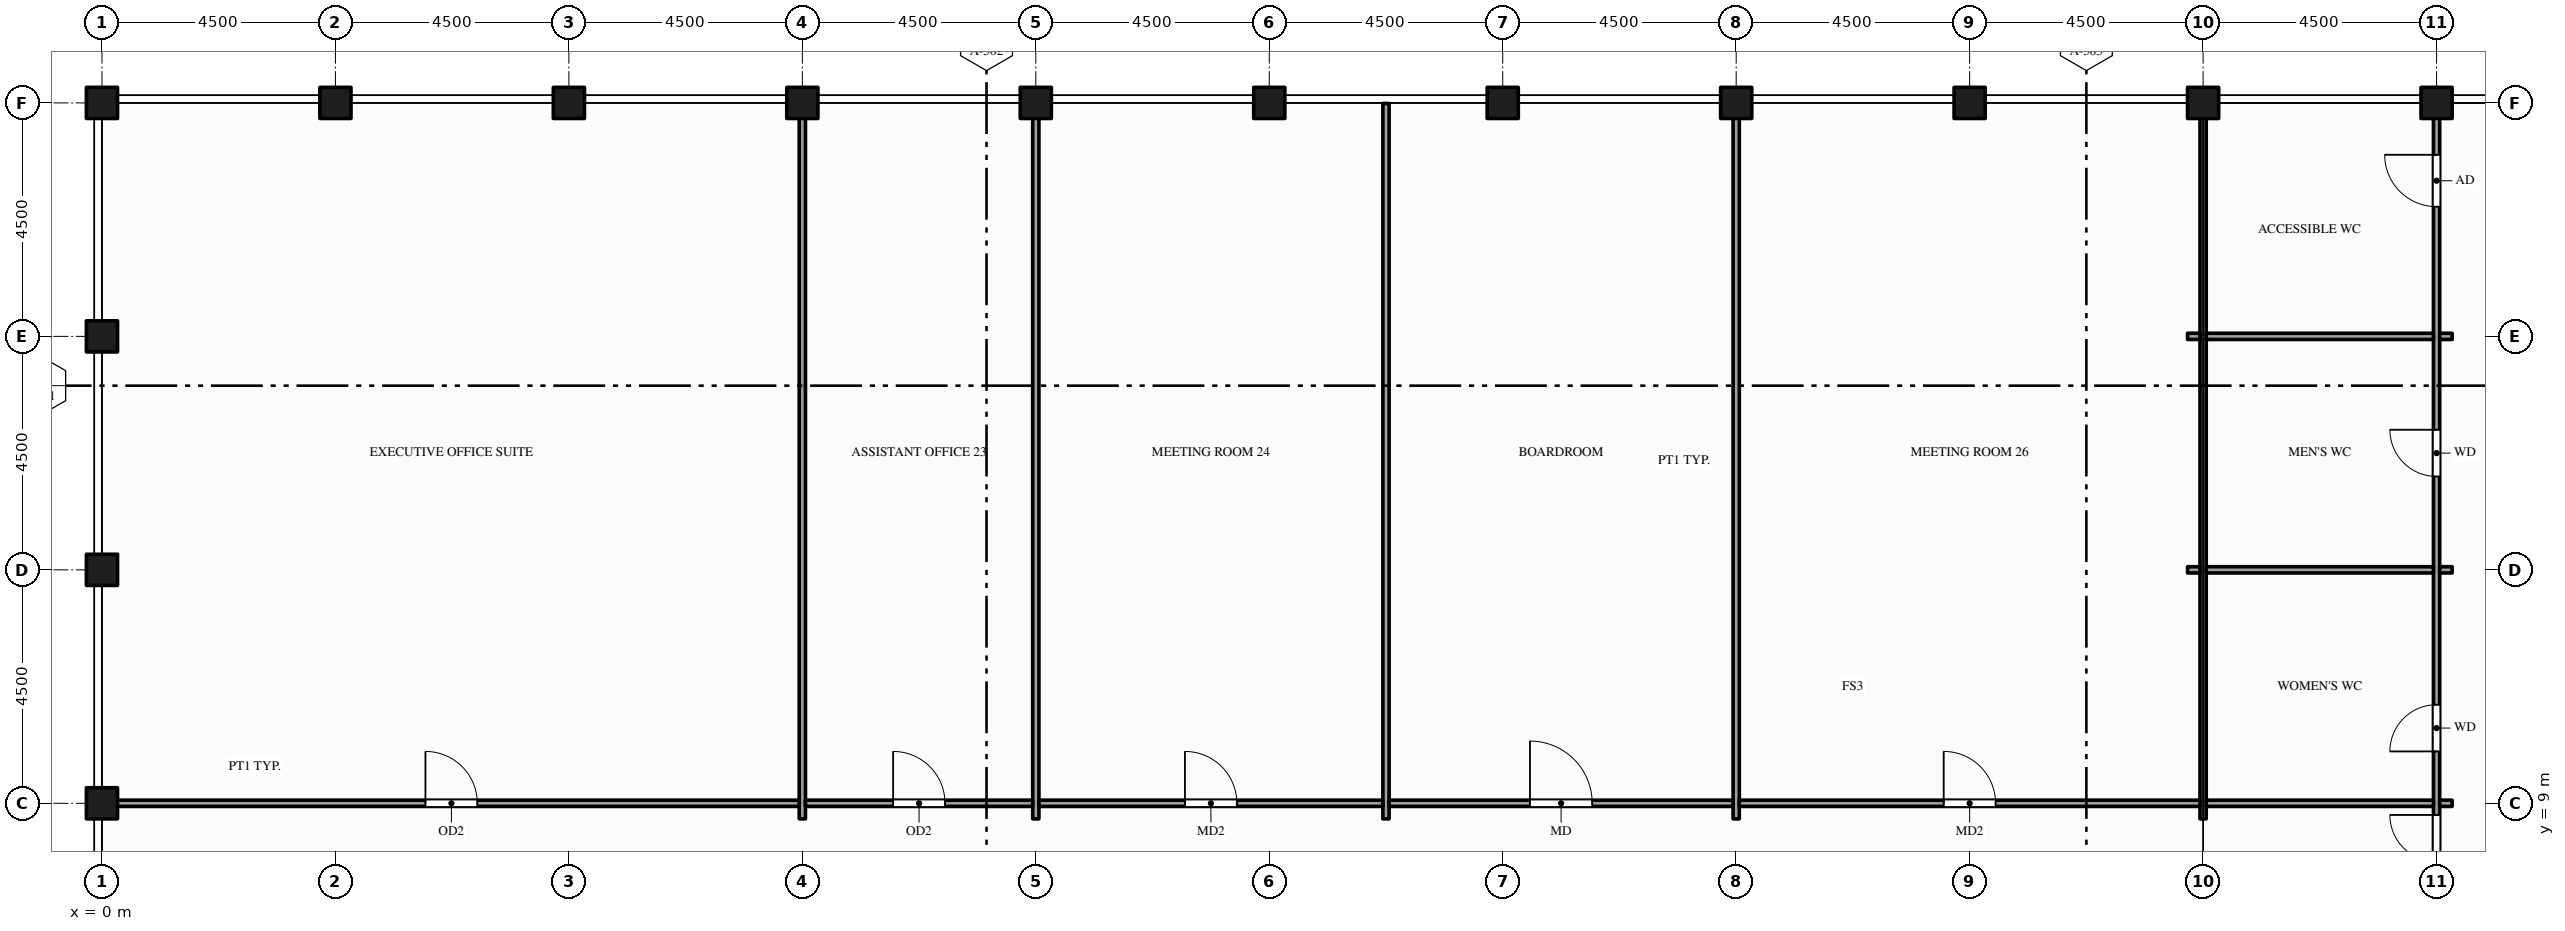
"""IFC4 building model, lengths in metres.
Left out: names, types, materials, properties, quantities, classifications, styles, units other than length and angle.
Written with IfcOpenShell. Run it as: python <this file> out.ifc"""

import sys

from ifc_helpers import new_model, si_unit, direction, frame, frame_2d, origin, origin_2d, place, context, subcontext, project, spatial, rectangle, hollow_rectangle, extrude, element, fill, save


model = new_model("IFC4")
c1 = context("Model", 3, precision=1e-05, world=origin(), true_north=direction((0.0, 1.0)))
c2 = subcontext(c1, "Body", "Model", "MODEL_VIEW")
j1 = project(units=[si_unit("LENGTHUNIT", "METRE"), si_unit("PLANEANGLEUNIT", "RADIAN")], contexts=[c1])
p1 = place(None, origin())
s1 = spatial("IfcSite", under=j1, at=p1, CompositionType="ELEMENT")
p2 = place(p1, origin())
s2 = spatial("IfcBuilding", under=s1, at=p2, CompositionType="ELEMENT")
p3 = place(p2, frame((0.0, 0.0, 341.0)))
s3 = spatial("IfcBuildingStorey", under=s2, at=p3, CompositionType="ELEMENT", Elevation=341.0)
for number, where, z_axis, x_axis in (
    (1, (0.0, 9.0, -0.15), (0.0, 0.0, 1.0), (1.0, 0.0, 0.0)),
    (2, (0.0, 13.5, -0.15), (0.0, 0.0, 1.0), (1.0, 0.0, 0.0)),
    (3, (0.0, 18.0, -0.15), (0.0, 0.0, 1.0), (1.0, 0.0, 0.0)),
    (4, (0.0, 22.5, -0.15), (0.0, 0.0, 1.0), (1.0, 0.0, 0.0)),
    (5, (4.5, 22.5, -0.15), (0.0, 0.0, 1.0), (1.0, 0.0, 0.0)),
    (6, (9.0, 22.5, -0.15), (0.0, 0.0, 1.0), (1.0, 0.0, 0.0)),
    (7, (13.5, 22.5, -0.15), (0.0, 0.0, 1.0), (1.0, 0.0, 0.0)),
    (8, (18.0, 22.5, -0.15), (0.0, 0.0, 1.0), (1.0, 0.0, 0.0)),
    (9, (22.5, 22.5, -0.15), (0.0, 0.0, 1.0), (1.0, 0.0, 0.0)),
    (10, (27.0, 22.5, -0.15), (0.0, 0.0, 1.0), (1.0, 0.0, 0.0)),
    (11, (31.5, 22.5, -0.15), (0.0, 0.0, 1.0), (1.0, 0.0, 0.0)),
    (12, (36.0, 22.5, -0.15), (0.0, 0.0, 1.0), (1.0, 0.0, 0.0)),
    (13, (40.5, 22.5, -0.15), (0.0, 0.0, 1.0), (1.0, 0.0, 0.0)),
):
    element("IfcColumn", number, at=place(p3, frame(where, z_axis=z_axis, x_axis=x_axis)), inside=s3, PredefinedType="COLUMN", context=c2, shape_type="SweptSolid", body=[
        extrude(hollow_rectangle(XDim=0.6, YDim=0.6, WallThickness=0.03, at=origin_2d()), origin(), (0.0, 0.0, 1.0), 4.4),
    ])
p4 = place(p3, frame((45.0, 22.5, -0.15), z_axis=(0.0, 0.0, 1.0), x_axis=(1.0, 0.0, 0.0)))
e14 = element("IfcColumn", 14, at=p4, inside=s3, PredefinedType="COLUMN", context=c2, shape_type="SweptSolid", body=[
    extrude(hollow_rectangle(XDim=0.6, YDim=0.6, WallThickness=0.03, at=origin_2d()), origin(), (0.0, 0.0, 1.0), 4.45),
])
for number, where, z_axis, x_axis in (
    (15, (13.5, 8.7, 0.0), (0.0, 0.0, 1.0), (0.0, 1.0, 0.0)),
    (16, (18.0, 8.7, 0.0), (0.0, 0.0, 1.0), (0.0, 1.0, 0.0)),
    (17, (24.75, 8.7, 0.0), (0.0, 0.0, 1.0), (0.0, 1.0, 0.0)),
    (18, (31.5, 8.7, 0.0), (0.0, 0.0, 1.0), (0.0, 1.0, 0.0)),
):
    element("IfcWall", number, at=place(p3, frame(where, z_axis=z_axis, x_axis=x_axis)), inside=s3, PredefinedType="PARTITIONING", context=c2, shape_type="SweptSolid", body=[
        extrude(rectangle(XDim=13.79, YDim=0.12, at=frame_2d((6.895, 0.0))), origin(), (0.0, 0.0, 1.0), 3.259),
    ])
p5 = place(p3, frame((40.5, 8.7, 0.0), z_axis=(0.0, 0.0, 1.0), x_axis=(0.0, 1.0, 0.0)))
e19 = element("IfcWall", 19, at=p5, inside=s3, PredefinedType="PARTITIONING", context=c2, shape_type="SweptSolid", body=[
    extrude(rectangle(XDim=13.79, YDim=0.12, at=frame_2d((6.895, 0.0))), origin(), (0.0, 0.0, 1.0), 4.3),
])
p6 = place(p3, frame((45.0, 0.01, 0.0), z_axis=(0.0, 0.0, 1.0), x_axis=(0.0, 1.0, 0.0)))
e20 = element("IfcWall", 20, at=p6, inside=s3, PredefinedType="PARTITIONING", context=c2, shape_type="SweptSolid", body=[
    extrude(rectangle(XDim=22.48, YDim=0.12, at=frame_2d((11.24, 0.0))), origin(), (0.0, 0.0, 1.0), 3.309),
])
p7 = place(p6, frame((6.965, 0.0, 0.0)))
e21 = element("IfcOpeningElement", 21, at=p7, cuts=e20, PredefinedType="OPENING", context=c2, shape_type="SweptSolid", body=[
    extrude(rectangle(XDim=1.8, YDim=2.1, at=frame_2d((0.9, 1.05))), frame((0.0, 0.07, 0.0), z_axis=(0.0, -1.0, 0.0), x_axis=(1.0, 0.0, 0.0)), (0.0, 0.0, 1.0), 0.14),
])
p8 = place(p6, frame((9.99, 0.0, 0.0)))
e22 = element("IfcOpeningElement", 22, at=p8, cuts=e20, PredefinedType="OPENING", context=c2, shape_type="SweptSolid", body=[
    extrude(rectangle(XDim=0.9, YDim=2.1, at=frame_2d((0.45, 1.05))), frame((0.0, 0.07, 0.0), z_axis=(0.0, -1.0, 0.0), x_axis=(1.0, 0.0, 0.0)), (0.0, 0.0, 1.0), 0.14),
])
p9 = place(p6, frame((15.29, 0.0, 0.0)))
e23 = element("IfcOpeningElement", 23, at=p9, cuts=e20, PredefinedType="OPENING", context=c2, shape_type="SweptSolid", body=[
    extrude(rectangle(XDim=0.9, YDim=2.1, at=frame_2d((0.45, 1.05))), frame((0.0, 0.07, 0.0), z_axis=(0.0, -1.0, 0.0), x_axis=(1.0, 0.0, 0.0)), (0.0, 0.0, 1.0), 0.14),
])
p10 = place(p6, frame((20.49, 0.0, 0.0)))
e24 = element("IfcOpeningElement", 24, at=p10, cuts=e20, PredefinedType="OPENING", context=c2, shape_type="SweptSolid", body=[
    extrude(rectangle(XDim=1.0, YDim=2.1, at=frame_2d((0.5, 1.05))), frame((0.0, 0.07, 0.0), z_axis=(0.0, -1.0, 0.0), x_axis=(1.0, 0.0, 0.0)), (0.0, 0.0, 1.0), 0.14),
])
p11 = place(p3, frame((0.01, 9.0, 0.0), z_axis=(0.0, 0.0, 1.0), x_axis=(1.0, 0.0, 0.0)))
e25 = element("IfcWall", 25, at=p11, inside=s3, PredefinedType="PARTITIONING", context=c2, shape_type="SweptSolid", body=[
    extrude(rectangle(XDim=13.43, YDim=0.12, at=frame_2d((6.715, 0.0))), origin(), (0.0, 0.0, 1.0), 3.259),
])
p12 = place(p11, frame((6.225, 0.0, 0.0)))
e26 = element("IfcOpeningElement", 26, at=p12, cuts=e25, PredefinedType="OPENING", context=c2, shape_type="SweptSolid", body=[
    extrude(rectangle(XDim=1.0, YDim=2.1, at=frame_2d((0.5, 1.05))), frame((0.0, 0.07, 0.0), z_axis=(0.0, -1.0, 0.0), x_axis=(1.0, 0.0, 0.0)), (0.0, 0.0, 1.0), 0.14),
])
p13 = place(p3, frame((13.56, 9.0, 0.0), z_axis=(0.0, 0.0, 1.0), x_axis=(1.0, 0.0, 0.0)))
e27 = element("IfcWall", 27, at=p13, inside=s3, PredefinedType="PARTITIONING", context=c2, shape_type="SweptSolid", body=[
    extrude(rectangle(XDim=4.38, YDim=0.12, at=frame_2d((2.19, 0.0))), origin(), (0.0, 0.0, 1.0), 3.259),
])
p14 = place(p13, frame((1.69, 0.0, 0.0)))
e28 = element("IfcOpeningElement", 28, at=p14, cuts=e27, PredefinedType="OPENING", context=c2, shape_type="SweptSolid", body=[
    extrude(rectangle(XDim=1.0, YDim=2.1, at=frame_2d((0.5, 1.05))), frame((0.0, 0.07, 0.0), z_axis=(0.0, -1.0, 0.0), x_axis=(1.0, 0.0, 0.0)), (0.0, 0.0, 1.0), 0.14),
])
p15 = place(p3, frame((18.06, 9.0, 0.0), z_axis=(0.0, 0.0, 1.0), x_axis=(1.0, 0.0, 0.0)))
e29 = element("IfcWall", 29, at=p15, inside=s3, PredefinedType="PARTITIONING", context=c2, shape_type="SweptSolid", body=[
    extrude(rectangle(XDim=6.63, YDim=0.12, at=frame_2d((3.315, 0.0))), origin(), (0.0, 0.0, 1.0), 3.259),
])
p16 = place(p15, frame((2.815, 0.0, 0.0)))
e30 = element("IfcOpeningElement", 30, at=p16, cuts=e29, PredefinedType="OPENING", context=c2, shape_type="SweptSolid", body=[
    extrude(rectangle(XDim=1.0, YDim=2.1, at=frame_2d((0.5, 1.05))), frame((0.0, 0.07, 0.0), z_axis=(0.0, -1.0, 0.0), x_axis=(1.0, 0.0, 0.0)), (0.0, 0.0, 1.0), 0.14),
])
p17 = place(p3, frame((24.81, 9.0, 0.0), z_axis=(0.0, 0.0, 1.0), x_axis=(1.0, 0.0, 0.0)))
e31 = element("IfcWall", 31, at=p17, inside=s3, PredefinedType="PARTITIONING", context=c2, shape_type="SweptSolid", body=[
    extrude(rectangle(XDim=6.63, YDim=0.12, at=frame_2d((3.315, 0.0))), origin(), (0.0, 0.0, 1.0), 3.259),
])
p18 = place(p17, frame((2.715, 0.0, 0.0)))
e32 = element("IfcOpeningElement", 32, at=p18, cuts=e31, PredefinedType="OPENING", context=c2, shape_type="SweptSolid", body=[
    extrude(rectangle(XDim=1.2, YDim=2.1, at=frame_2d((0.6, 1.05))), frame((0.0, 0.07, 0.0), z_axis=(0.0, -1.0, 0.0), x_axis=(1.0, 0.0, 0.0)), (0.0, 0.0, 1.0), 0.14),
])
p19 = place(p3, frame((31.56, 9.0, 0.0), z_axis=(0.0, 0.0, 1.0), x_axis=(1.0, 0.0, 0.0)))
e33 = element("IfcWall", 33, at=p19, inside=s3, PredefinedType="PARTITIONING", context=c2, shape_type="SweptSolid", body=[
    extrude(rectangle(XDim=8.88, YDim=0.12, at=frame_2d((4.44, 0.0))), origin(), (0.0, 0.0, 1.0), 3.259),
])
p20 = place(p19, frame((3.94, 0.0, 0.0)))
e34 = element("IfcOpeningElement", 34, at=p20, cuts=e33, PredefinedType="OPENING", context=c2, shape_type="SweptSolid", body=[
    extrude(rectangle(XDim=1.0, YDim=2.1, at=frame_2d((0.5, 1.05))), frame((0.0, 0.07, 0.0), z_axis=(0.0, -1.0, 0.0), x_axis=(1.0, 0.0, 0.0)), (0.0, 0.0, 1.0), 0.14),
])
p21 = place(p3, frame((40.56, 9.0, 0.0), z_axis=(0.0, 0.0, 1.0), x_axis=(1.0, 0.0, 0.0)))
e35 = element("IfcWall", 35, at=p21, inside=s3, PredefinedType="PARTITIONING", context=c2, shape_type="SweptSolid", body=[
    extrude(rectangle(XDim=4.38, YDim=0.12, at=frame_2d((2.19, 0.0))), origin(), (0.0, 0.0, 1.0), 3.309),
])
p22 = place(p3, frame((45.06, 9.0, 0.0), z_axis=(0.0, 0.0, 1.0), x_axis=(1.0, 0.0, 0.0)))
e36 = element("IfcWall", 36, at=p22, inside=s3, PredefinedType="PARTITIONING", context=c2, shape_type="SweptSolid", body=[
    extrude(rectangle(XDim=0.24, YDim=0.12, at=frame_2d((0.12, 0.0))), origin(), (0.0, 0.0, 1.0), 3.309),
])
p23 = place(p3, frame((40.2, 13.5, 0.0), z_axis=(0.0, 0.0, 1.0), x_axis=(1.0, 0.0, 0.0)))
e37 = element("IfcWall", 37, at=p23, inside=s3, PredefinedType="PARTITIONING", context=c2, shape_type="SweptSolid", body=[
    extrude(rectangle(XDim=0.24, YDim=0.12, at=frame_2d((0.12, 0.0))), origin(), (0.0, 0.0, 1.0), 4.25),
])
p24 = place(p3, frame((40.56, 13.5, 0.0), z_axis=(0.0, 0.0, 1.0), x_axis=(1.0, 0.0, 0.0)))
e38 = element("IfcWall", 38, at=p24, inside=s3, PredefinedType="PARTITIONING", context=c2, shape_type="SweptSolid", body=[
    extrude(rectangle(XDim=4.38, YDim=0.12, at=frame_2d((2.19, 0.0))), origin(), (0.0, 0.0, 1.0), 3.309),
])
p25 = place(p3, frame((45.06, 13.5, 0.0), z_axis=(0.0, 0.0, 1.0), x_axis=(1.0, 0.0, 0.0)))
e39 = element("IfcWall", 39, at=p25, inside=s3, PredefinedType="PARTITIONING", context=c2, shape_type="SweptSolid", body=[
    extrude(rectangle(XDim=0.24, YDim=0.12, at=frame_2d((0.12, 0.0))), origin(), (0.0, 0.0, 1.0), 3.309),
])
p26 = place(p3, frame((40.2, 18.0, 0.0), z_axis=(0.0, 0.0, 1.0), x_axis=(1.0, 0.0, 0.0)))
e40 = element("IfcWall", 40, at=p26, inside=s3, PredefinedType="PARTITIONING", context=c2, shape_type="SweptSolid", body=[
    extrude(rectangle(XDim=0.24, YDim=0.12, at=frame_2d((0.12, 0.0))), origin(), (0.0, 0.0, 1.0), 4.25),
])
p27 = place(p3, frame((40.56, 18.0, 0.0), z_axis=(0.0, 0.0, 1.0), x_axis=(1.0, 0.0, 0.0)))
e41 = element("IfcWall", 41, at=p27, inside=s3, PredefinedType="PARTITIONING", context=c2, shape_type="SweptSolid", body=[
    extrude(rectangle(XDim=4.38, YDim=0.12, at=frame_2d((2.19, 0.0))), origin(), (0.0, 0.0, 1.0), 3.309),
])
p28 = place(p3, frame((45.06, 18.0, 0.0), z_axis=(0.0, 0.0, 1.0), x_axis=(1.0, 0.0, 0.0)))
e42 = element("IfcWall", 42, at=p28, inside=s3, PredefinedType="PARTITIONING", context=c2, shape_type="SweptSolid", body=[
    extrude(rectangle(XDim=0.24, YDim=0.12, at=frame_2d((0.12, 0.0))), origin(), (0.0, 0.0, 1.0), 3.309),
])
p29 = place(p7, origin())
e43 = element("IfcDoor", 43, at=p29, inside=s3, OperationType="DOUBLE_DOOR_SINGLE_SWING", PredefinedType="DOOR", context=c2, shape_type="SweptSolid", body=[
    extrude(rectangle(XDim=1.8, YDim=2.1, at=frame_2d((0.9, 1.05))), frame((0.0, 0.025, 0.0), z_axis=(0.0, -1.0, 0.0), x_axis=(1.0, 0.0, 0.0)), (0.0, 0.0, 1.0), 0.05),
])
fill(e21, e43)
p30 = place(p12, origin())
e44 = element("IfcDoor", 44, at=p30, inside=s3, OperationType="SINGLE_SWING_LEFT", PredefinedType="DOOR", context=c2, shape_type="SweptSolid", body=[
    extrude(rectangle(XDim=1.0, YDim=2.1, at=frame_2d((0.5, 1.05))), frame((0.0, 0.025, 0.0), z_axis=(0.0, -1.0, 0.0), x_axis=(1.0, 0.0, 0.0)), (0.0, 0.0, 1.0), 0.05),
])
fill(e26, e44)
p31 = place(p14, origin())
e45 = element("IfcDoor", 45, at=p31, inside=s3, OperationType="SINGLE_SWING_LEFT", PredefinedType="DOOR", context=c2, shape_type="SweptSolid", body=[
    extrude(rectangle(XDim=1.0, YDim=2.1, at=frame_2d((0.5, 1.05))), frame((0.0, 0.025, 0.0), z_axis=(0.0, -1.0, 0.0), x_axis=(1.0, 0.0, 0.0)), (0.0, 0.0, 1.0), 0.05),
])
fill(e28, e45)
p32 = place(p16, origin())
e46 = element("IfcDoor", 46, at=p32, inside=s3, OperationType="SINGLE_SWING_LEFT", PredefinedType="DOOR", context=c2, shape_type="SweptSolid", body=[
    extrude(rectangle(XDim=1.0, YDim=2.1, at=frame_2d((0.5, 1.05))), frame((0.0, 0.025, 0.0), z_axis=(0.0, -1.0, 0.0), x_axis=(1.0, 0.0, 0.0)), (0.0, 0.0, 1.0), 0.05),
])
fill(e30, e46)
p33 = place(p18, origin())
e47 = element("IfcDoor", 47, at=p33, inside=s3, OperationType="SINGLE_SWING_LEFT", PredefinedType="DOOR", context=c2, shape_type="SweptSolid", body=[
    extrude(rectangle(XDim=1.2, YDim=2.1, at=frame_2d((0.6, 1.05))), frame((0.0, 0.025, 0.0), z_axis=(0.0, -1.0, 0.0), x_axis=(1.0, 0.0, 0.0)), (0.0, 0.0, 1.0), 0.05),
])
fill(e32, e47)
p34 = place(p20, origin())
e48 = element("IfcDoor", 48, at=p34, inside=s3, OperationType="SINGLE_SWING_LEFT", PredefinedType="DOOR", context=c2, shape_type="SweptSolid", body=[
    extrude(rectangle(XDim=1.0, YDim=2.1, at=frame_2d((0.5, 1.05))), frame((0.0, 0.025, 0.0), z_axis=(0.0, -1.0, 0.0), x_axis=(1.0, 0.0, 0.0)), (0.0, 0.0, 1.0), 0.05),
])
fill(e34, e48)
p35 = place(p8, origin())
e49 = element("IfcDoor", 49, at=p35, inside=s3, OperationType="SINGLE_SWING_LEFT", PredefinedType="DOOR", context=c2, shape_type="SweptSolid", body=[
    extrude(rectangle(XDim=0.9, YDim=2.1, at=frame_2d((0.45, 1.05))), frame((0.0, 0.025, 0.0), z_axis=(0.0, -1.0, 0.0), x_axis=(1.0, 0.0, 0.0)), (0.0, 0.0, 1.0), 0.05),
])
fill(e22, e49)
p36 = place(p9, origin())
e50 = element("IfcDoor", 50, at=p36, inside=s3, OperationType="SINGLE_SWING_RIGHT", PredefinedType="DOOR", context=c2, shape_type="SweptSolid", body=[
    extrude(rectangle(XDim=0.9, YDim=2.1, at=frame_2d((0.45, 1.05))), frame((0.0, 0.025, 0.0), z_axis=(0.0, -1.0, 0.0), x_axis=(1.0, 0.0, 0.0)), (0.0, 0.0, 1.0), 0.05),
])
fill(e23, e50)
p37 = place(p10, origin())
e51 = element("IfcDoor", 51, at=p37, inside=s3, OperationType="SINGLE_SWING_RIGHT", PredefinedType="DOOR", context=c2, shape_type="SweptSolid", body=[
    extrude(rectangle(XDim=1.0, YDim=2.1, at=frame_2d((0.5, 1.05))), frame((0.0, 0.025, 0.0), z_axis=(0.0, -1.0, 0.0), x_axis=(1.0, 0.0, 0.0)), (0.0, 0.0, 1.0), 0.05),
])
fill(e24, e51)
save(model, sys.argv[1])
